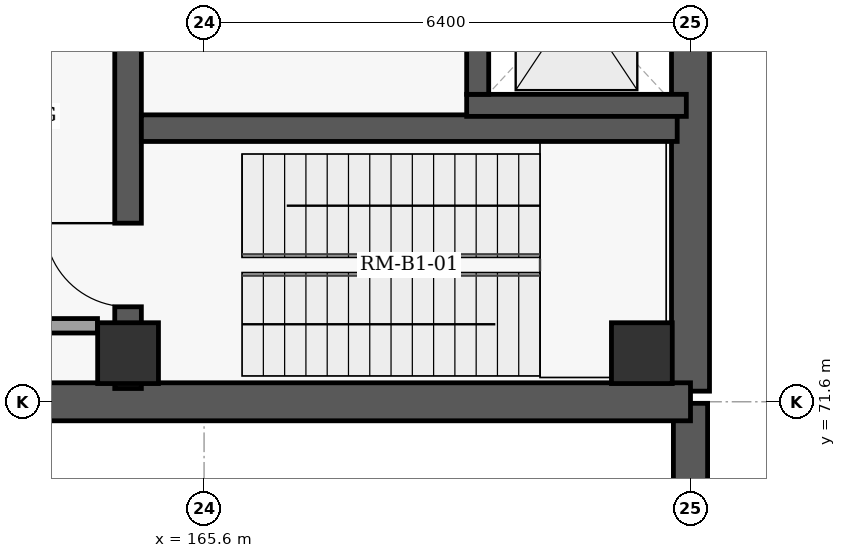
"""IFC4 building model, lengths in metres.
Left out: names, types, materials, properties, quantities, classifications, styles, units other than length and angle.
Written with IfcOpenShell. Run it as: python <this file> out.ifc"""

import sys

from ifc_helpers import new_model, si_unit, direction, frame, frame_2d, origin, origin_2d, place, context, subcontext, project, spatial, rectangle, extrude, element, fill, save


model = new_model("IFC4")
c1 = context("Model", 3, precision=1e-05, world=origin(), true_north=direction((0.0, 1.0)))
c2 = subcontext(c1, "Body", "Model", "MODEL_VIEW")
j1 = project(units=[si_unit("LENGTHUNIT", "METRE"), si_unit("PLANEANGLEUNIT", "RADIAN")], contexts=[c1])
p1 = place(None, origin())
s1 = spatial("IfcSite", under=j1, at=p1, CompositionType="ELEMENT")
p2 = place(p1, origin())
s2 = spatial("IfcBuilding", under=s1, at=p2, CompositionType="ELEMENT")
p3 = place(p2, frame((0.0, 0.0, -4.8)))
s3 = spatial("IfcBuildingStorey", under=s2, at=p3, CompositionType="ELEMENT", Elevation=-4.8)
for number, where, z_axis, x_axis in (
    (1, (164.6, 72.24, 0.0), (0.0, 0.0, 1.0), (1.0, 0.0, 0.0)),
    (2, (171.36, 72.24, 0.0), (0.0, 0.0, 1.0), (1.0, 0.0, 0.0)),
):
    element("IfcColumn", number, at=place(p3, frame(where, z_axis=z_axis, x_axis=x_axis)), inside=s3, PredefinedType="COLUMN", context=c2, shape_type="SweptSolid", body=[
        extrude(rectangle(XDim=0.8, YDim=0.8, at=origin_2d()), origin(), (0.0, 0.0, 1.0), 4.8),
    ])
p4 = place(p3, frame((172.0, 63.62, 0.0), z_axis=(0.0, 0.0, 1.0), x_axis=(0.0, 1.0, 0.0)))
e3 = element("IfcWall", 3, at=p4, inside=s3, PredefinedType="USERDEFINED", context=c2, shape_type="SweptSolid", body=[
    extrude(rectangle(XDim=7.96, YDim=0.45, at=frame_2d((3.98, 0.0))), origin(), (0.0, 0.0, 1.0), 4.53),
])
p5 = place(p3, frame((172.0, 117.86, 0.0), z_axis=(0.0, 0.0, 1.0), x_axis=(0.0, -1.0, 0.0)))
e4 = element("IfcWall", 4, at=p5, inside=s3, PredefinedType="USERDEFINED", context=c2, shape_type="SweptSolid", body=[
    extrude(rectangle(XDim=46.12, YDim=0.5, at=frame_2d((23.06, 0.0))), origin(), (0.0, 0.0, 1.0), 4.5),
])
p6 = place(p3, frame((172.0, 71.6, 0.0), z_axis=(0.0, 0.0, 1.0), x_axis=(-1.0, 0.0, 0.0)))
e5 = element("IfcWall", 5, at=p6, inside=s3, PredefinedType="USERDEFINED", context=c2, shape_type="SweptSolid", body=[
    extrude(rectangle(XDim=32.4, YDim=0.5, at=frame_2d((16.2, 0.0))), origin(), (0.0, 0.0, 1.0), 4.5),
])
p7 = place(p3, frame((164.6, 71.775, 0.0), z_axis=(0.0, 0.0, 1.0), x_axis=(0.0, 1.0, 0.0)))
e6 = element("IfcWall", 6, at=p7, inside=s3, PredefinedType="SHEAR", context=c2, shape_type="SweptSolid", body=[
    extrude(rectangle(XDim=7.423, YDim=0.35, at=frame_2d((3.711, 0.0))), origin(), (0.0, 0.0, 1.0), 4.5),
])
p8 = place(p7, frame((1.075, 0.0, 0.0)))
e7 = element("IfcOpeningElement", 7, at=p8, cuts=e6, PredefinedType="OPENING", context=c2, shape_type="SweptSolid", body=[
    extrude(rectangle(XDim=1.1, YDim=2.15, at=frame_2d((0.55, 1.075))), frame((0.0, 0.185, 0.0), z_axis=(0.0, -1.0, 0.0), x_axis=(1.0, 0.0, 0.0)), (0.0, 0.0, 1.0), 0.37),
])
p9 = place(p7, frame((5.05, 0.0, 0.0)))
e8 = element("IfcOpeningElement", 8, at=p9, cuts=e6, PredefinedType="OPENING", context=c2, shape_type="SweptSolid", body=[
    extrude(rectangle(XDim=1.15, YDim=2.2, at=frame_2d((0.575, 1.1))), frame((0.0, 0.185, 0.0), z_axis=(0.0, -1.0, 0.0), x_axis=(1.0, 0.0, 0.0)), (0.0, 0.0, 1.0), 0.37),
])
p10 = place(p3, frame((164.775, 75.2, 0.0), z_axis=(0.0, 0.0, 1.0), x_axis=(1.0, 0.0, 0.0)))
e9 = element("IfcWall", 9, at=p10, inside=s3, PredefinedType="SHEAR", context=c2, shape_type="SweptSolid", body=[
    extrude(rectangle(XDim=7.05, YDim=0.35, at=frame_2d((3.525, 0.0))), origin(), (0.0, 0.0, 1.0), 4.5),
])
p11 = place(p3, frame((169.055, 75.5, 0.0), z_axis=(0.0, 0.0, 1.0), x_axis=(1.0, 0.0, 0.0)))
e10 = element("IfcWall", 10, at=p11, inside=s3, PredefinedType="SHEAR", context=c2, shape_type="SweptSolid", body=[
    extrude(rectangle(XDim=2.89, YDim=0.29, at=frame_2d((1.445, 0.0))), origin(), (0.0, 0.0, 1.0), 4.5),
])
p12 = place(p3, frame((169.2, 75.645, 0.0), z_axis=(0.0, 0.0, 1.0), x_axis=(0.0, 1.0, 0.0)))
e11 = element("IfcWall", 11, at=p12, inside=s3, PredefinedType="SHEAR", context=c2, shape_type="SweptSolid", body=[
    extrude(rectangle(XDim=2.51, YDim=0.29, at=frame_2d((1.255, 0.0))), origin(), (0.0, 0.0, 1.0), 4.5),
])
p13 = place(p12, frame((0.705, 0.0, 0.0)))
e12 = element("IfcOpeningElement", 12, at=p13, cuts=e11, PredefinedType="OPENING", context=c2, shape_type="SweptSolid", body=[
    extrude(rectangle(XDim=1.1, YDim=2.15, at=frame_2d((0.55, 1.075))), frame((0.0, 0.155, 0.0), z_axis=(0.0, -1.0, 0.0), x_axis=(1.0, 0.0, 0.0)), (0.0, 0.0, 1.0), 0.31),
])
p14 = place(p3, frame((160.105, 72.6, 0.0), z_axis=(0.0, 0.0, 1.0), x_axis=(1.0, 0.0, 0.0)))
e13 = element("IfcWall", 13, at=p14, inside=s3, PredefinedType="PARTITIONING", context=c2, shape_type="SweptSolid", body=[
    extrude(rectangle(XDim=4.093, YDim=0.19, at=frame_2d((2.046, 0.0))), origin(), (0.0, 0.0, 1.0), 3.85),
])
p15 = place(p8, origin())
e14 = element("IfcDoor", 14, at=p15, inside=s3, OperationType="SINGLE_SWING_RIGHT", PredefinedType="DOOR", context=c2, shape_type="SweptSolid", body=[
    extrude(rectangle(XDim=1.1, YDim=2.15, at=frame_2d((0.55, 1.075))), frame((0.0, 0.025, 0.0), z_axis=(0.0, -1.0, 0.0), x_axis=(1.0, 0.0, 0.0)), (0.0, 0.0, 1.0), 0.05),
])
fill(e7, e14)
save(model, sys.argv[1])
